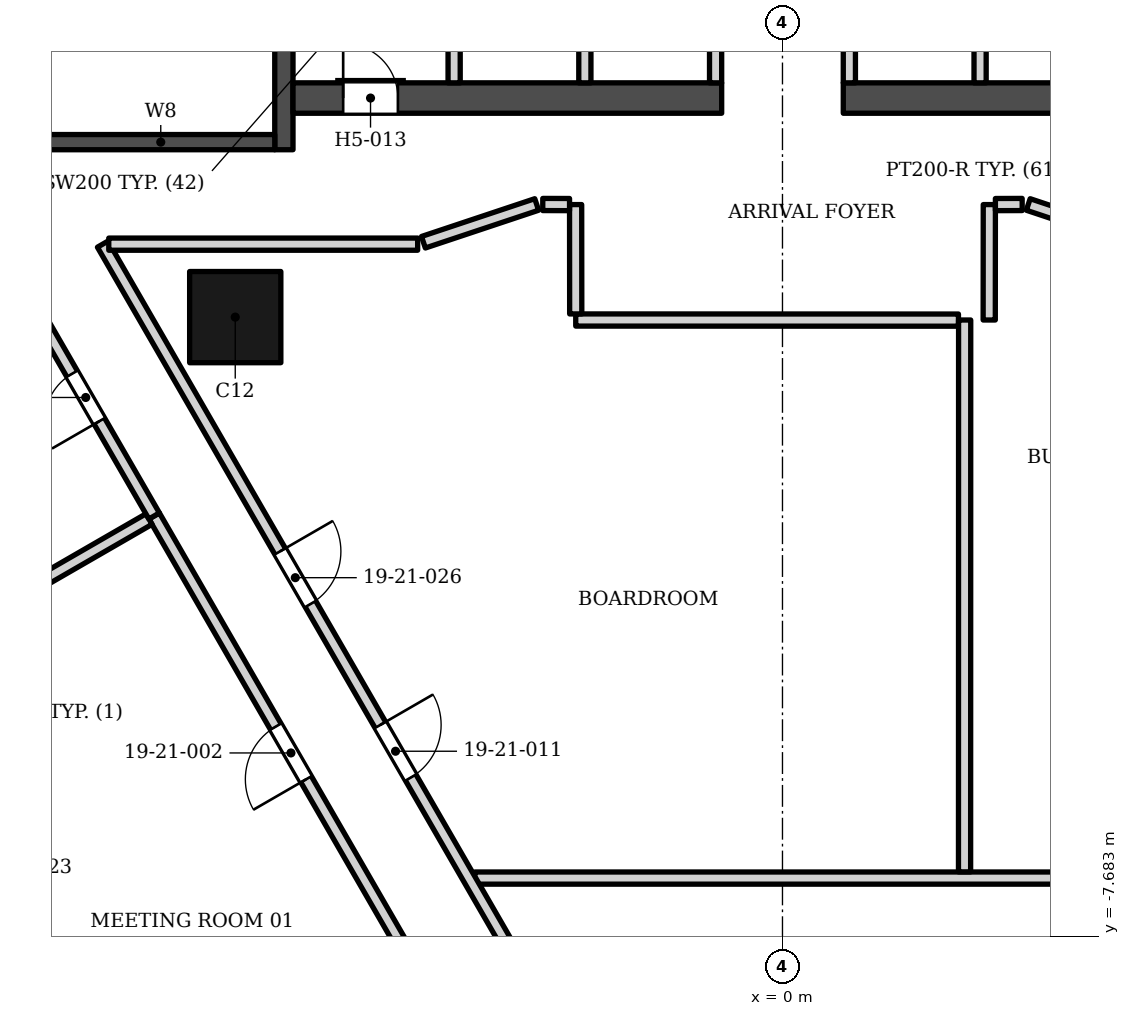
"""IFC4 building model, lengths in metres.
Left out: names, types, materials, properties, quantities, classifications, styles, units other than length and angle.
Written with IfcOpenShell. Run it as: python <this file> out.ifc"""

import sys

from ifc_helpers import new_model, si_unit, direction, frame, frame_2d, origin, origin_2d, place, context, subcontext, project, spatial, rectangle, extrude, element, fill, save


model = new_model("IFC4")
c1 = context("Model", 3, precision=1e-05, world=origin(), true_north=direction((0.0, 1.0)))
c2 = subcontext(c1, "Body", "Model", "MODEL_VIEW")
j1 = project(units=[si_unit("LENGTHUNIT", "METRE"), si_unit("PLANEANGLEUNIT", "RADIAN")], contexts=[c1])
p1 = place(None, origin())
s1 = spatial("IfcSite", under=j1, at=p1, CompositionType="ELEMENT")
p2 = place(p1, origin())
s2 = spatial("IfcBuilding", under=s1, at=p2, CompositionType="ELEMENT")
p3 = place(p2, frame((0.0, 0.0, 91.8)))
s3 = spatial("IfcBuildingStorey", under=s2, at=p3, CompositionType="ELEMENT", Elevation=91.8)
p4 = place(p3, frame((-8.2, 5.253, 0.0), z_axis=(0.0, 0.0, 1.0), x_axis=(0.0, 1.0, 0.0)))
e1 = element("IfcWall", 1, at=p4, inside=s3, PredefinedType="SHEAR", context=c2, shape_type="SweptSolid", body=[
    extrude(rectangle(XDim=13.3, YDim=0.3, at=frame_2d((6.65, 0.0))), origin(), (0.0, 0.0, 1.0), 3.4),
])
p5 = place(p4, frame((7.1, 0.0, 0.0)))
e2 = element("IfcOpeningElement", 2, at=p5, cuts=e1, PredefinedType="OPENING", context=c2, shape_type="SweptSolid", body=[
    extrude(rectangle(XDim=1.4, YDim=2.1, at=frame_2d((0.7, 1.05))), frame((0.0, 0.16, 0.0), z_axis=(0.0, -1.0, 0.0), x_axis=(1.0, 0.0, 0.0)), (0.0, 0.0, 1.0), 0.32),
])
p6 = place(p4, frame((5.05, 0.0, 0.0)))
e3 = element("IfcOpeningElement", 3, at=p6, cuts=e1, PredefinedType="OPENING", context=c2, shape_type="SweptSolid", body=[
    extrude(rectangle(XDim=1.4, YDim=2.1, at=frame_2d((0.7, 1.05))), frame((0.0, 0.16, 0.0), z_axis=(0.0, -1.0, 0.0), x_axis=(1.0, 0.0, 0.0)), (0.0, 0.0, 1.0), 0.32),
])
p7 = place(p3, frame((-12.1, 5.378, 0.0), z_axis=(0.0, 0.0, 1.0), x_axis=(1.0, 0.0, 0.0)))
e4 = element("IfcWall", 4, at=p7, inside=s3, PredefinedType="SHEAR", context=c2, shape_type="SweptSolid", body=[
    extrude(rectangle(XDim=3.75, YDim=0.25, at=frame_2d((1.875, 0.0))), origin(), (0.0, 0.0, 1.0), 3.4),
])
p8 = place(p3, frame((-8.05, 6.103, 0.0), z_axis=(0.0, 0.0, 1.0), x_axis=(1.0, 0.0, 0.0)))
e5 = element("IfcWall", 5, at=p8, inside=s3, PredefinedType="SHEAR", context=c2, shape_type="SweptSolid", body=[
    extrude(rectangle(XDim=7.05, YDim=0.5, at=frame_2d((3.525, 0.0))), origin(), (0.0, 0.0, 1.0), 3.4),
])
p9 = place(p8, frame((0.825, 0.0, 0.0)))
e6 = element("IfcOpeningElement", 6, at=p9, cuts=e5, PredefinedType="OPENING", context=c2, shape_type="SweptSolid", body=[
    extrude(rectangle(XDim=0.9, YDim=2.1, at=frame_2d((0.45, 1.05))), frame((0.0, 0.26, 0.0), z_axis=(0.0, -1.0, 0.0), x_axis=(1.0, 0.0, 0.0)), (0.0, 0.0, 1.0), 0.52),
])
p10 = place(p3, frame((1.0, 6.103, 0.0), z_axis=(0.0, 0.0, 1.0), x_axis=(1.0, 0.0, 0.0)))
e7 = element("IfcWall", 7, at=p10, inside=s3, PredefinedType="SHEAR", context=c2, shape_type="SweptSolid", body=[
    extrude(rectangle(XDim=7.05, YDim=0.5, at=frame_2d((3.525, 0.0))), origin(), (0.0, 0.0, 1.0), 3.4),
])
p11 = place(p10, frame((5.325, 0.0, 0.0)))
e8 = element("IfcOpeningElement", 8, at=p11, cuts=e7, PredefinedType="OPENING", context=c2, shape_type="SweptSolid", body=[
    extrude(rectangle(XDim=0.9, YDim=2.1, at=frame_2d((0.45, 1.05))), frame((0.0, 0.26, 0.0), z_axis=(0.0, -1.0, 0.0), x_axis=(1.0, 0.0, 0.0)), (0.0, 0.0, 1.0), 0.52),
])
p12 = place(p3, frame((-9.0, 2.5, 0.0), z_axis=(0.0, 0.0, 1.0), x_axis=(1.0, 0.0, 0.0)))
e9 = element("IfcColumn", 9, at=p12, inside=s3, PredefinedType="COLUMN", context=c2, shape_type="SweptSolid", body=[
    extrude(rectangle(XDim=1.5, YDim=1.5, at=origin_2d()), origin(), (0.0, 0.0, 1.0), 3.4),
])
p13 = place(p3, frame((-12.857, -7.596, 0.0), z_axis=(0.0, 0.0, 1.0), x_axis=(0.500027713859, -0.866009402589, 0.0)))
e10 = element("IfcWall", 10, at=p13, inside=s3, PredefinedType="ELEMENTEDWALL", context=c2, shape_type="SweptSolid", body=[
    extrude(rectangle(XDim=4.2, YDim=0.2, at=frame_2d((2.1, 0.0))), origin(), (0.0, 0.0, 1.0), 2.65),
])
p14 = place(p13, frame((0.3, 0.0, 0.6)))
e11 = element("IfcOpeningElement", 11, at=p14, cuts=e10, PredefinedType="OPENING", context=c2, shape_type="SweptSolid", body=[
    extrude(rectangle(XDim=2.1, YDim=1.8, at=frame_2d((1.05, 0.9))), frame((0.0, 0.11, 0.0), z_axis=(0.0, -1.0, 0.0), x_axis=(1.0, 0.0, 0.0)), (0.0, 0.0, 1.0), 0.22),
])
p15 = place(p13, frame((2.7, 0.0, 0.0)))
e12 = element("IfcOpeningElement", 12, at=p15, cuts=e10, PredefinedType="OPENING", context=c2, shape_type="SweptSolid", body=[
    extrude(rectangle(XDim=1.2, YDim=2.4, at=frame_2d((0.6, 1.2))), frame((0.0, 0.11, 0.0), z_axis=(0.0, -1.0, 0.0), x_axis=(1.0, 0.0, 0.0)), (0.0, 0.0, 1.0), 0.22),
])
for number, where, z_axis, x_axis in (
    (13, (-5.4, 6.353, 0.0), (0.0, 0.0, 1.0), (0.0, 1.0, 0.0)),
    (14, (-3.25, 6.353, 0.0), (0.0, 0.0, 1.0), (0.0, 1.0, 0.0)),
    (15, (-1.1, 6.353, 0.0), (0.0, 0.0, 1.0), (0.0, 1.0, 0.0)),
    (16, (1.1, 6.353, 0.0), (0.0, 0.0, 1.0), (0.0, 1.0, 0.0)),
    (17, (3.25, 6.353, 0.0), (0.0, 0.0, 1.0), (0.0, 1.0, 0.0)),
):
    element("IfcWall", number, at=place(p3, frame(where, z_axis=z_axis, x_axis=x_axis)), inside=s3, PredefinedType="SOLIDWALL", context=c2, shape_type="SweptSolid", body=[
        extrude(rectangle(XDim=2.5, YDim=0.2, at=frame_2d((1.25, 0.0))), origin(), (0.0, 0.0, 1.0), 3.23),
    ])
p16 = place(p3, frame((-10.334, -0.77, 0.0), z_axis=(0.0, 0.0, 1.0), x_axis=(0.499996405163, -0.866027479255, 0.0)))
e18 = element("IfcWall", 18, at=p16, inside=s3, PredefinedType="PARTITIONING", context=c2, shape_type="SweptSolid", body=[
    extrude(rectangle(XDim=20.803, YDim=0.2, at=frame_2d((10.401, 0.0))), origin(), (0.0, 0.0, 1.0), 2.384),
])
p17 = place(p16, frame((4.0, 0.0, 0.0)))
e19 = element("IfcOpeningElement", 19, at=p17, cuts=e18, PredefinedType="OPENING", context=c2, shape_type="SweptSolid", body=[
    extrude(rectangle(XDim=1.0, YDim=2.1, at=frame_2d((0.5, 1.05))), frame((0.0, 0.11, 0.0), z_axis=(0.0, -1.0, 0.0), x_axis=(1.0, 0.0, 0.0)), (0.0, 0.0, 1.0), 0.22),
])
p18 = place(p16, frame((9.7, 0.0, 0.0)))
e20 = element("IfcOpeningElement", 20, at=p18, cuts=e18, PredefinedType="OPENING", context=c2, shape_type="SweptSolid", body=[
    extrude(rectangle(XDim=1.0, YDim=2.1, at=frame_2d((0.5, 1.05))), frame((0.0, 0.11, 0.0), z_axis=(0.0, -1.0, 0.0), x_axis=(1.0, 0.0, 0.0)), (0.0, 0.0, 1.0), 0.22),
])
p19 = place(p16, frame((16.6, 0.0, 0.0)))
e21 = element("IfcOpeningElement", 21, at=p19, cuts=e18, PredefinedType="OPENING", context=c2, shape_type="SweptSolid", body=[
    extrude(rectangle(XDim=1.1, YDim=2.1, at=frame_2d((0.55, 1.05))), frame((0.0, 0.11, 0.0), z_axis=(0.0, -1.0, 0.0), x_axis=(1.0, 0.0, 0.0)), (0.0, 0.0, 1.0), 0.22),
])
p20 = place(p16, frame((18.852, 0.0, 0.0)))
e22 = element("IfcOpeningElement", 22, at=p20, cuts=e18, PredefinedType="OPENING", context=c2, shape_type="SweptSolid", body=[
    extrude(rectangle(XDim=1.1, YDim=2.1, at=frame_2d((0.55, 1.05))), frame((0.0, 0.11, 0.0), z_axis=(0.0, -1.0, 0.0), x_axis=(1.0, 0.0, 0.0)), (0.0, 0.0, 1.0), 0.22),
])
p21 = place(p3, frame((3.379, -10.049, 0.0), z_axis=(0.0, 0.0, 1.0), x_axis=(0.50000242408, 0.866024004237, 0.0)))
e23 = element("IfcWall", 23, at=p21, inside=s3, PredefinedType="PARTITIONING", context=c2, shape_type="SweptSolid", body=[
    extrude(rectangle(XDim=15.877, YDim=0.2, at=frame_2d((7.938, 0.0))), origin(), (0.0, 0.0, 1.0), 2.384),
])
p22 = place(p21, frame((9.359, 0.0, 0.0)))
e24 = element("IfcOpeningElement", 24, at=p22, cuts=e23, PredefinedType="OPENING", context=c2, shape_type="SweptSolid", body=[
    extrude(rectangle(XDim=1.0, YDim=2.1, at=frame_2d((0.5, 1.05))), frame((0.0, 0.11, 0.0), z_axis=(0.0, -1.0, 0.0), x_axis=(1.0, 0.0, 0.0)), (0.0, 0.0, 1.0), 0.22),
])
p23 = place(p3, frame((-5.061, -6.725, 0.0), z_axis=(0.0, 0.0, 1.0), x_axis=(1.0, 0.0, 0.0)))
e25 = element("IfcWall", 25, at=p23, inside=s3, PredefinedType="PARTITIONING", context=c2, shape_type="SweptSolid", body=[
    extrude(rectangle(XDim=10.261, YDim=0.2, at=frame_2d((5.13, 0.0))), origin(), (0.0, 0.0, 1.0), 2.384),
])
p24 = place(p3, frame((-14.792, -3.344, 0.0), z_axis=(0.0, 0.0, 1.0), x_axis=(0.866188805601, 0.49971687289, 0.0)))
e26 = element("IfcWall", 26, at=p24, inside=s3, PredefinedType="PARTITIONING", context=c2, shape_type="SweptSolid", body=[
    extrude(rectangle(XDim=5.05, YDim=0.2, at=frame_2d((2.525, 0.0))), origin(), (0.0, 0.0, 1.0), 2.473),
])
p25 = place(p3, frame((-12.534, 3.04, 0.0), z_axis=(0.0, 0.0, 1.0), x_axis=(0.50001224981, -0.866018331238, 0.0)))
e27 = element("IfcWall", 27, at=p25, inside=s3, PredefinedType="PARTITIONING", context=c2, shape_type="SweptSolid", body=[
    extrude(rectangle(XDim=4.4, YDim=0.2, at=frame_2d((2.2, 0.0))), origin(), (0.0, 0.0, 1.0), 3.23),
])
p26 = place(p25, frame((1.7, 0.0, 0.0)))
e28 = element("IfcOpeningElement", 28, at=p26, cuts=e27, PredefinedType="OPENING", context=c2, shape_type="SweptSolid", body=[
    extrude(rectangle(XDim=0.9, YDim=2.1, at=frame_2d((0.45, 1.05))), frame((0.0, 0.11, 0.0), z_axis=(0.0, -1.0, 0.0), x_axis=(1.0, 0.0, 0.0)), (0.0, 0.0, 1.0), 0.22),
])
p27 = place(p3, frame((-3.4, 2.452, 0.0), z_axis=(0.0, 0.0, 1.0), x_axis=(0.999999963142, -0.000271507243, 0.0)))
e29 = element("IfcWall", 29, at=p27, inside=s3, PredefinedType="PARTITIONING", context=c2, shape_type="SweptSolid", body=[
    extrude(rectangle(XDim=6.294, YDim=0.2, at=frame_2d((3.147, 0.0))), origin(), (0.0, 0.0, 1.0), 3.23),
])
p28 = place(p3, frame((2.994, -6.623, 0.0), z_axis=(0.0, 0.0, 1.0), x_axis=(0.000215209959, 0.999999976842, 0.0)))
e30 = element("IfcWall", 30, at=p28, inside=s3, PredefinedType="PARTITIONING", context=c2, shape_type="SweptSolid", body=[
    extrude(rectangle(XDim=9.075, YDim=0.2, at=frame_2d((4.538, 0.0))), origin(), (0.0, 0.0, 1.0), 3.23),
])
p29 = place(p3, frame((-3.402, 4.351, 0.0), z_axis=(0.0, 0.0, 1.0), x_axis=(0.001086217961, -0.999999410065, 0.0)))
e31 = element("IfcWall", 31, at=p29, inside=s3, PredefinedType="PARTITIONING", context=c2, shape_type="SweptSolid", body=[
    extrude(rectangle(XDim=1.798, YDim=0.2, at=frame_2d((0.899, 0.0))), origin(), (0.0, 0.0, 1.0), 3.23),
])
p30 = place(p3, frame((-11.18, 3.7, 0.0), z_axis=(0.0, 0.0, 1.0), x_axis=(0.500129162475, -0.865950818951, 0.0)))
e32 = element("IfcWall", 32, at=p30, inside=s3, PredefinedType="PARTITIONING", context=c2, shape_type="SweptSolid", body=[
    extrude(rectangle(XDim=22.499, YDim=0.2, at=frame_2d((11.249, 0.0))), origin(), (0.0, 0.0, 1.0), 2.384),
])
p31 = place(p30, frame((9.13, 0.0, 0.0)))
e33 = element("IfcOpeningElement", 33, at=p31, cuts=e32, PredefinedType="OPENING", context=c2, shape_type="SweptSolid", body=[
    extrude(rectangle(XDim=1.0, YDim=2.1, at=frame_2d((0.5, 1.05))), frame((0.0, 0.11, 0.0), z_axis=(0.0, -1.0, 0.0), x_axis=(1.0, 0.0, 0.0)), (0.0, 0.0, 1.0), 0.22),
])
p32 = place(p30, frame((15.111, 0.0, 0.0)))
e34 = element("IfcOpeningElement", 34, at=p32, cuts=e32, PredefinedType="OPENING", context=c2, shape_type="SweptSolid", body=[
    extrude(rectangle(XDim=1.0, YDim=2.1, at=frame_2d((0.5, 1.05))), frame((0.0, 0.11, 0.0), z_axis=(0.0, -1.0, 0.0), x_axis=(1.0, 0.0, 0.0)), (0.0, 0.0, 1.0), 0.22),
])
p33 = place(p30, frame((5.834, 0.0, 0.0)))
e35 = element("IfcOpeningElement", 35, at=p33, cuts=e32, PredefinedType="OPENING", context=c2, shape_type="SweptSolid", body=[
    extrude(rectangle(XDim=1.0, YDim=2.1, at=frame_2d((0.5, 1.05))), frame((0.0, 0.11, 0.0), z_axis=(0.0, -1.0, 0.0), x_axis=(1.0, 0.0, 0.0)), (0.0, 0.0, 1.0), 0.22),
])
p34 = place(p3, frame((-11.08, 3.7, 0.0), z_axis=(0.0, 0.0, 1.0), x_axis=(1.0, 0.0, 0.0)))
e36 = element("IfcWall", 36, at=p34, inside=s3, PredefinedType="PARTITIONING", context=c2, shape_type="SweptSolid", body=[
    extrude(rectangle(XDim=5.08, YDim=0.2, at=frame_2d((2.54, 0.0))), origin(), (0.0, 0.0, 1.0), 2.832),
])
for number, where, z_axis, x_axis in (
    (37, (4.042, 4.352, 0.0), (0.0, 0.0, 1.0), (0.949, -0.316, 0.0)),
    (38, (-5.905, 3.731, 0.0), (0.0, 0.0, 1.0), (0.949, 0.316, 0.0)),
):
    element("IfcWall", number, at=place(p3, frame(where, z_axis=z_axis, x_axis=x_axis)), inside=s3, PredefinedType="PARTITIONING", context=c2, shape_type="SweptSolid", body=[
        extrude(rectangle(XDim=1.964, YDim=0.2, at=frame_2d((0.982, 0.0))), origin(), (0.0, 0.0, 1.0), 2.384),
    ])
p35 = place(p3, frame((-3.942, 4.352, 0.0), z_axis=(0.0, 0.0, 1.0), x_axis=(0.999996159087, -0.00277160798, 0.0)))
e39 = element("IfcWall", 39, at=p35, inside=s3, PredefinedType="PARTITIONING", context=c2, shape_type="SweptSolid", body=[
    extrude(rectangle(XDim=0.44, YDim=0.2, at=frame_2d((0.22, 0.0))), origin(), (0.0, 0.0, 1.0), 3.23),
])
p36 = place(p3, frame((3.4, 2.452, 0.0), z_axis=(0.0, 0.0, 1.0), x_axis=(0.001028938362, 0.999999470643, 0.0)))
e40 = element("IfcWall", 40, at=p36, inside=s3, PredefinedType="PARTITIONING", context=c2, shape_type="SweptSolid", body=[
    extrude(rectangle(XDim=1.898, YDim=0.2, at=frame_2d((0.949, 0.0))), origin(), (0.0, 0.0, 1.0), 3.23),
])
p37 = place(p3, frame((3.502, 4.351, 0.0), z_axis=(0.0, 0.0, 1.0), x_axis=(0.999996159087, 0.00277160798, 0.0)))
e41 = element("IfcWall", 41, at=p37, inside=s3, PredefinedType="PARTITIONING", context=c2, shape_type="SweptSolid", body=[
    extrude(rectangle(XDim=0.44, YDim=0.2, at=frame_2d((0.22, 0.0))), origin(), (0.0, 0.0, 1.0), 3.23),
])
p38 = place(p9, origin())
e42 = element("IfcDoor", 42, at=p38, inside=s3, OperationType="SINGLE_SWING_LEFT", PredefinedType="DOOR", context=c2, shape_type="SweptSolid", body=[
    extrude(rectangle(XDim=0.9, YDim=2.1, at=frame_2d((0.45, 1.05))), frame((0.0, 0.025, 0.0), z_axis=(0.0, -1.0, 0.0), x_axis=(1.0, 0.0, 0.0)), (0.0, 0.0, 1.0), 0.05),
])
fill(e6, e42)
p39 = place(p26, origin())
e43 = element("IfcDoor", 43, at=p39, inside=s3, OperationType="SINGLE_SWING_RIGHT", PredefinedType="DOOR", context=c2, shape_type="SweptSolid", body=[
    extrude(rectangle(XDim=0.9, YDim=2.1, at=frame_2d((0.45, 1.05))), frame((0.0, 0.025, 0.0), z_axis=(0.0, -1.0, 0.0), x_axis=(1.0, 0.0, 0.0)), (0.0, 0.0, 1.0), 0.05),
])
fill(e28, e43)
p40 = place(p17, origin())
e44 = element("IfcDoor", 44, at=p40, inside=s3, OperationType="SINGLE_SWING_RIGHT", PredefinedType="DOOR", context=c2, shape_type="SweptSolid", body=[
    extrude(rectangle(XDim=1.0, YDim=2.1, at=frame_2d((0.5, 1.05))), frame((0.0, 0.025, 0.0), z_axis=(0.0, -1.0, 0.0), x_axis=(1.0, 0.0, 0.0)), (0.0, 0.0, 1.0), 0.05),
])
fill(e19, e44)
p41 = place(p31, origin())
e45 = element("IfcDoor", 45, at=p41, inside=s3, OperationType="SINGLE_SWING_LEFT", PredefinedType="DOOR", context=c2, shape_type="SweptSolid", body=[
    extrude(rectangle(XDim=1.0, YDim=2.1, at=frame_2d((0.5, 1.05))), frame((0.0, 0.025, 0.0), z_axis=(0.0, -1.0, 0.0), x_axis=(1.0, 0.0, 0.0)), (0.0, 0.0, 1.0), 0.05),
])
fill(e33, e45)
p42 = place(p33, origin())
e46 = element("IfcDoor", 46, at=p42, inside=s3, OperationType="SINGLE_SWING_LEFT", PredefinedType="DOOR", context=c2, shape_type="SweptSolid", body=[
    extrude(rectangle(XDim=1.0, YDim=2.1, at=frame_2d((0.5, 1.05))), frame((0.0, 0.025, 0.0), z_axis=(0.0, -1.0, 0.0), x_axis=(1.0, 0.0, 0.0)), (0.0, 0.0, 1.0), 0.05),
])
fill(e35, e46)
save(model, sys.argv[1])
